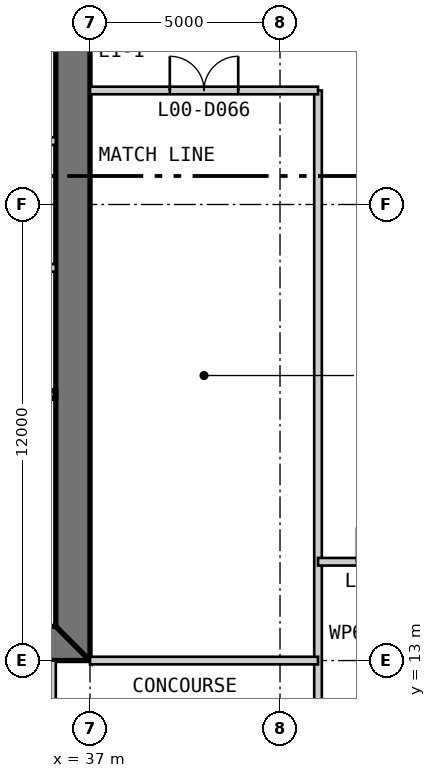
"""IFC4 building model, lengths in metres.
Left out: names, types, materials, properties, quantities, classifications, styles, units other than length and angle.
Written with IfcOpenShell. Run it as: python <this file> out.ifc"""

import sys

from ifc_helpers import new_model, si_unit, direction, frame, frame_2d, origin, place, context, subcontext, project, spatial, polyline, rectangle, outline, extrude, element, fill, save


model = new_model("IFC4")
c1 = context("Model", 3, precision=1e-05, world=origin(), true_north=direction((0.0, 1.0)))
c2 = subcontext(c1, "Body", "Model", "MODEL_VIEW")
j1 = project(units=[si_unit("LENGTHUNIT", "METRE"), si_unit("PLANEANGLEUNIT", "RADIAN")], contexts=[c1])
p1 = place(None, origin())
s1 = spatial("IfcSite", under=j1, at=p1, CompositionType="ELEMENT")
p2 = place(p1, origin())
s2 = spatial("IfcBuilding", under=s1, at=p2, CompositionType="ELEMENT")
p3 = place(p2, origin())
s3 = spatial("IfcBuildingStorey", under=s2, at=p3, CompositionType="ELEMENT", Elevation=0.0)
p4 = place(p3, frame((13.0, 13.45, 0.0), z_axis=(0.0, 0.0, 1.0), x_axis=(1.0, 0.0, 0.0)))
e1 = element("IfcWall", 1, at=p4, inside=s3, PredefinedType="SHEAR", context=c2, shape_type="SweptSolid", body=[
    extrude(outline(polyline([(0.0, -0.45), (24.0, -0.45), (23.1, 0.45), (0.9, 0.45), (0.0, -0.45)])), origin(), (0.0, 0.0, 1.0), 7.0),
])
p5 = place(p4, frame((4.9, 0.0, 0.0)))
e2 = element("IfcOpeningElement", 2, at=p5, cuts=e1, PredefinedType="OPENING", context=c2, shape_type="SweptSolid", body=[
    extrude(rectangle(XDim=1.0, YDim=2.2, at=frame_2d((0.5, 1.1))), frame((0.0, 0.46, 0.0), z_axis=(0.0, -1.0, 0.0), x_axis=(1.0, 0.0, 0.0)), (0.0, 0.0, 1.0), 0.92),
])
p6 = place(p4, frame((8.9, 0.0, 0.0)))
e3 = element("IfcOpeningElement", 3, at=p6, cuts=e1, PredefinedType="OPENING", context=c2, shape_type="SweptSolid", body=[
    extrude(rectangle(XDim=1.1, YDim=2.2, at=frame_2d((0.55, 1.1))), frame((0.0, 0.46, 0.0), z_axis=(0.0, -1.0, 0.0), x_axis=(1.0, 0.0, 0.0)), (0.0, 0.0, 1.0), 0.92),
])
p7 = place(p4, frame((15.05, 0.0, 0.0)))
e4 = element("IfcOpeningElement", 4, at=p7, cuts=e1, PredefinedType="OPENING", context=c2, shape_type="SweptSolid", body=[
    extrude(rectangle(XDim=0.9, YDim=2.2, at=frame_2d((0.45, 1.1))), frame((0.0, 0.46, 0.0), z_axis=(0.0, -1.0, 0.0), x_axis=(1.0, 0.0, 0.0)), (0.0, 0.0, 1.0), 0.92),
])
p8 = place(p4, frame((17.9, 0.0, 0.0)))
e5 = element("IfcOpeningElement", 5, at=p8, cuts=e1, PredefinedType="OPENING", context=c2, shape_type="SweptSolid", body=[
    extrude(rectangle(XDim=1.0, YDim=2.2, at=frame_2d((0.5, 1.1))), frame((0.0, 0.46, 0.0), z_axis=(0.0, -1.0, 0.0), x_axis=(1.0, 0.0, 0.0)), (0.0, 0.0, 1.0), 0.92),
])
p9 = place(p4, frame((21.4, 0.0, 0.0)))
e6 = element("IfcOpeningElement", 6, at=p9, cuts=e1, PredefinedType="OPENING", context=c2, shape_type="SweptSolid", body=[
    extrude(rectangle(XDim=1.0, YDim=2.2, at=frame_2d((0.5, 1.1))), frame((0.0, 0.46, 0.0), z_axis=(0.0, -1.0, 0.0), x_axis=(1.0, 0.0, 0.0)), (0.0, 0.0, 1.0), 0.92),
])
p10 = place(p3, frame((36.55, 13.9, 0.0), z_axis=(0.0, 0.0, 1.0), x_axis=(0.0, 1.0, 0.0)))
e7 = element("IfcWall", 7, at=p10, inside=s3, PredefinedType="SHEAR", context=c2, shape_type="SweptSolid", body=[
    extrude(outline(polyline([(-0.9, -0.45), (23.1, -0.45), (22.2, 0.45), (0.0, 0.45), (-0.9, -0.45)])), origin(), (0.0, 0.0, 1.0), 7.0),
])
p11 = place(p10, frame((20.2, 0.0, 0.0)))
e8 = element("IfcOpeningElement", 8, at=p11, cuts=e7, PredefinedType="OPENING", context=c2, shape_type="SweptSolid", body=[
    extrude(rectangle(XDim=1.0, YDim=2.2, at=frame_2d((0.5, 1.1))), frame((0.0, 0.46, 0.0), z_axis=(0.0, -1.0, 0.0), x_axis=(1.0, 0.0, 0.0)), (0.0, 0.0, 1.0), 0.92),
])
p12 = place(p10, frame((17.25, 0.0, 0.0)))
e9 = element("IfcOpeningElement", 9, at=p12, cuts=e7, PredefinedType="OPENING", context=c2, shape_type="SweptSolid", body=[
    extrude(rectangle(XDim=0.9, YDim=2.2, at=frame_2d((0.45, 1.1))), frame((0.0, 0.46, 0.0), z_axis=(0.0, -1.0, 0.0), x_axis=(1.0, 0.0, 0.0)), (0.0, 0.0, 1.0), 0.92),
])
p13 = place(p3, frame((20.3, 20.0, 0.0), z_axis=(0.0, 0.0, 1.0), x_axis=(1.0, 0.0, 0.0)))
e10 = element("IfcWall", 10, at=p13, inside=s3, PredefinedType="SOLIDWALL", context=c2, shape_type="SweptSolid", body=[
    extrude(rectangle(XDim=15.8, YDim=0.2, at=frame_2d((7.9, 0.0))), origin(), (0.0, 0.0, 1.0), 6.8),
])
for number, where, z_axis, x_axis in (
    (11, (36.1, 26.667, 0.0), (0.0, 0.0, 1.0), (-1.0, 0.0, 0.0)),
    (12, (36.1, 23.333, 0.0), (0.0, 0.0, 1.0), (-1.0, 0.0, 0.0)),
):
    element("IfcWall", number, at=place(p3, frame(where, z_axis=z_axis, x_axis=x_axis)), inside=s3, PredefinedType="PARTITIONING", context=c2, shape_type="SweptSolid", body=[
        extrude(rectangle(XDim=2.8, YDim=0.2, at=frame_2d((1.4, 0.0))), origin(), (0.0, 0.0, 1.0), 6.8),
    ])
p14 = place(p3, frame((36.0, 7.0, 0.0), z_axis=(0.0, 0.0, 1.0), x_axis=(0.0, 1.0, 0.0)))
e13 = element("IfcWall", 13, at=p14, inside=s3, PredefinedType="PARTITIONING", context=c2, shape_type="SweptSolid", body=[
    extrude(rectangle(XDim=6.0, YDim=0.2, at=frame_2d((3.0, 0.0))), origin(), (0.0, 0.0, 1.0), 6.7),
])
p15 = place(p14, frame((3.3, 0.0, 0.0)))
e14 = element("IfcOpeningElement", 14, at=p15, cuts=e13, PredefinedType="OPENING", context=c2, shape_type="SweptSolid", body=[
    extrude(rectangle(XDim=0.9, YDim=2.2, at=frame_2d((0.45, 1.1))), frame((0.0, 0.11, 0.0), z_axis=(0.0, -1.0, 0.0), x_axis=(1.0, 0.0, 0.0)), (0.0, 0.0, 1.0), 0.22),
])
p16 = place(p3, frame((43.0, -0.6, 0.0), z_axis=(0.0, 0.0, 1.0), x_axis=(0.0, 1.0, 0.0)))
e15 = element("IfcWall", 15, at=p16, inside=s3, PredefinedType="PARTITIONING", context=c2, shape_type="SweptSolid", body=[
    extrude(rectangle(XDim=28.6, YDim=0.2, at=frame_2d((14.3, 0.0))), origin(), (0.0, 0.0, 1.0), 6.043),
])
p17 = place(p3, frame((37.0, 13.0, 0.0), z_axis=(0.0, 0.0, 1.0), x_axis=(1.0, 0.0, 0.0)))
e16 = element("IfcWall", 16, at=p17, inside=s3, PredefinedType="PARTITIONING", context=c2, shape_type="SweptSolid", body=[
    extrude(rectangle(XDim=6.0, YDim=0.2, at=frame_2d((3.0, 0.0))), origin(), (0.0, 0.0, 1.0), 5.853),
])
p18 = place(p3, frame((43.0, 15.6, 0.0), z_axis=(0.0, 0.0, 1.0), x_axis=(1.0, 0.0, 0.0)))
e17 = element("IfcWall", 17, at=p18, inside=s3, PredefinedType="PARTITIONING", context=c2, shape_type="SweptSolid", body=[
    extrude(rectangle(XDim=22.25, YDim=0.2, at=frame_2d((11.125, 0.0))), origin(), (0.0, 0.0, 1.0), 6.7),
])
p19 = place(p18, frame((10.125, 0.0, 0.0)))
e18 = element("IfcOpeningElement", 18, at=p19, cuts=e17, PredefinedType="OPENING", context=c2, shape_type="SweptSolid", body=[
    extrude(rectangle(XDim=1.8, YDim=2.4, at=frame_2d((0.9, 1.2))), frame((0.0, 0.11, 0.0), z_axis=(0.0, -1.0, 0.0), x_axis=(1.0, 0.0, 0.0)), (0.0, 0.0, 1.0), 0.22),
])
p20 = place(p18, frame((17.425, 0.0, 0.0)))
e19 = element("IfcOpeningElement", 19, at=p20, cuts=e17, PredefinedType="OPENING", context=c2, shape_type="SweptSolid", body=[
    extrude(rectangle(XDim=1.8, YDim=2.4, at=frame_2d((0.9, 1.2))), frame((0.0, 0.11, 0.0), z_axis=(0.0, -1.0, 0.0), x_axis=(1.0, 0.0, 0.0)), (0.0, 0.0, 1.0), 0.22),
])
p21 = place(p18, frame((1.025, 0.0, 0.0)))
e20 = element("IfcOpeningElement", 20, at=p21, cuts=e17, PredefinedType="OPENING", context=c2, shape_type="SweptSolid", body=[
    extrude(rectangle(XDim=1.8, YDim=2.4, at=frame_2d((0.9, 1.2))), frame((0.0, 0.11, 0.0), z_axis=(0.0, -1.0, 0.0), x_axis=(1.0, 0.0, 0.0)), (0.0, 0.0, 1.0), 0.22),
])
p22 = place(p18, frame((4.8, 0.0, 0.0)))
e21 = element("IfcOpeningElement", 21, at=p22, cuts=e17, PredefinedType="OPENING", context=c2, shape_type="SweptSolid", body=[
    extrude(rectangle(XDim=1.8, YDim=2.4, at=frame_2d((0.9, 1.2))), frame((0.0, 0.11, 0.0), z_axis=(0.0, -1.0, 0.0), x_axis=(1.0, 0.0, 0.0)), (0.0, 0.0, 1.0), 0.22),
])
p23 = place(p3, frame((37.0, 28.0, 0.0), z_axis=(0.0, 0.0, 1.0), x_axis=(1.0, 0.0, 0.0)))
e22 = element("IfcWall", 22, at=p23, inside=s3, PredefinedType="PARTITIONING", context=c2, shape_type="SweptSolid", body=[
    extrude(rectangle(XDim=6.0, YDim=0.2, at=frame_2d((3.0, 0.0))), origin(), (0.0, 0.0, 1.0), 6.7),
])
p24 = place(p23, frame((2.1, 0.0, 0.0)))
e23 = element("IfcOpeningElement", 23, at=p24, cuts=e22, PredefinedType="OPENING", context=c2, shape_type="SweptSolid", body=[
    extrude(rectangle(XDim=1.8, YDim=2.4, at=frame_2d((0.9, 1.2))), frame((0.0, 0.11, 0.0), z_axis=(0.0, -1.0, 0.0), x_axis=(1.0, 0.0, 0.0)), (0.0, 0.0, 1.0), 0.22),
])
p25 = place(p24, origin())
e24 = element("IfcDoor", 24, at=p25, inside=s3, OperationType="DOUBLE_DOOR_SINGLE_SWING", PredefinedType="DOOR", context=c2, shape_type="SweptSolid", body=[
    extrude(rectangle(XDim=1.8, YDim=2.4, at=frame_2d((0.9, 1.2))), frame((0.0, 0.025, 0.0), z_axis=(0.0, -1.0, 0.0), x_axis=(1.0, 0.0, 0.0)), (0.0, 0.0, 1.0), 0.05),
])
fill(e23, e24)
save(model, sys.argv[1])
